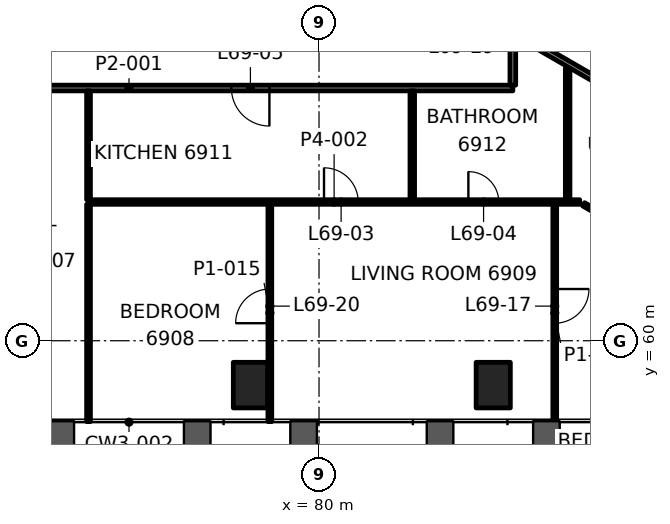
"""IFC4 building model, lengths in metres.
Left out: names, types, materials, properties, quantities, classifications, styles, units other than length and angle.
Written with IfcOpenShell. Run it as: python <this file> out.ifc"""

import sys

from ifc_helpers import new_model, si_unit, direction, frame, frame_2d, origin, origin_2d, place, context, subcontext, project, spatial, rectangle, hollow_rectangle, extrude, element, fill, save


model = new_model("IFC4")
c1 = context("Model", 3, precision=1e-05, world=origin(), true_north=direction((0.0, 1.0)))
c2 = subcontext(c1, "Body", "Model", "MODEL_VIEW")
j1 = project(units=[si_unit("LENGTHUNIT", "METRE"), si_unit("PLANEANGLEUNIT", "RADIAN")], contexts=[c1])
p1 = place(None, origin())
s1 = spatial("IfcSite", under=j1, at=p1, CompositionType="ELEMENT")
p2 = place(p1, origin())
s2 = spatial("IfcBuilding", under=s1, at=p2, CompositionType="ELEMENT")
p3 = place(p2, frame((0.0, 0.0, 288.1)))
s3 = spatial("IfcBuildingStorey", under=s2, at=p3, CompositionType="ELEMENT", Elevation=288.1)
for number, where, z_axis, x_axis in (
    (1, (78.195, 58.832, -0.0), (0.0, 0.0, 1.0), (1.0, 0.0, 0.0)),
    (2, (84.584, 58.832, -0.0), (0.0, 0.0, 1.0), (1.0, 0.0, 0.0)),
):
    element("IfcColumn", number, at=place(p3, frame(where, z_axis=z_axis, x_axis=x_axis)), inside=s3, PredefinedType="COLUMN", context=c2, shape_type="SweptSolid", body=[
        extrude(hollow_rectangle(XDim=0.9, YDim=1.2, WallThickness=0.06, at=origin_2d()), origin(), (0.0, 0.0, 1.0), 3.5),
    ])
p4 = place(p3, frame((73.935, 63.65, 0.0), z_axis=(0.0, 0.0, 1.0), x_axis=(1.0, 0.0, 0.0)))
e3 = element("IfcWall", 3, at=p4, inside=s3, PredefinedType="PARTITIONING", context=c2, shape_type="SweptSolid", body=[
    extrude(rectangle(XDim=12.924, YDim=0.12, at=frame_2d((6.462, 0.0))), origin(), (0.0, 0.0, 1.0), 2.7),
])
p5 = place(p4, frame((6.197, 0.0, 0.0)))
e4 = element("IfcOpeningElement", 4, at=p5, cuts=e3, PredefinedType="OPENING", context=c2, shape_type="SweptSolid", body=[
    extrude(rectangle(XDim=0.9, YDim=2.1, at=frame_2d((0.45, 1.05))), frame((0.0, 0.07, 0.0), z_axis=(0.0, -1.0, 0.0), x_axis=(1.0, 0.0, 0.0)), (0.0, 0.0, 1.0), 0.14),
])
p6 = place(p4, frame((9.995, 0.0, 0.0)))
e5 = element("IfcOpeningElement", 5, at=p6, cuts=e3, PredefinedType="OPENING", context=c2, shape_type="SweptSolid", body=[
    extrude(rectangle(XDim=0.8, YDim=2.1, at=frame_2d((0.4, 1.05))), frame((0.0, 0.07, 0.0), z_axis=(0.0, -1.0, 0.0), x_axis=(1.0, 0.0, 0.0)), (0.0, 0.0, 1.0), 0.14),
])
p7 = place(p3, frame((85.1, 66.65, 0.0), z_axis=(0.0, 0.0, 1.0), x_axis=(-1.0, 0.0, 0.0)))
e6 = element("IfcWall", 6, at=p7, inside=s3, PredefinedType="PARTITIONING", context=c2, shape_type="SweptSolid", body=[
    extrude(rectangle(XDim=20.2, YDim=0.15, at=frame_2d((10.1, 0.0))), origin(), (0.0, 0.0, 1.0), 2.7),
])
p8 = place(p7, frame((6.405, 0.0, 0.0)))
e7 = element("IfcOpeningElement", 7, at=p8, cuts=e6, PredefinedType="OPENING", context=c2, shape_type="SweptSolid", body=[
    extrude(rectangle(XDim=1.0, YDim=2.1, at=frame_2d((0.5, 1.05))), frame((0.0, 0.085, 0.0), z_axis=(0.0, -1.0, 0.0), x_axis=(1.0, 0.0, 0.0)), (0.0, 0.0, 1.0), 0.17),
])
p9 = place(p7, frame((12.845, 0.0, 0.0)))
e8 = element("IfcOpeningElement", 8, at=p9, cuts=e6, PredefinedType="OPENING", context=c2, shape_type="SweptSolid", body=[
    extrude(rectangle(XDim=0.9, YDim=2.1, at=frame_2d((0.45, 1.05))), frame((0.0, 0.085, 0.0), z_axis=(0.0, -1.0, 0.0), x_axis=(1.0, 0.0, 0.0)), (0.0, 0.0, 1.0), 0.17),
])
p10 = place(p3, frame((86.542, 63.71, 0.0), z_axis=(0.0, 0.0, 1.0), x_axis=(0.0, 1.0, 0.0)))
e9 = element("IfcWall", 9, at=p10, inside=s3, PredefinedType="PARTITIONING", context=c2, shape_type="SweptSolid", body=[
    extrude(rectangle(XDim=3.46, YDim=0.12, at=frame_2d((1.73, 0.0))), origin(), (0.0, 0.0, 1.0), 2.547),
])
p11 = place(p3, frame((86.203, 63.59, 0.0), z_axis=(0.0, 0.0, 1.0), x_axis=(0.0, -1.0, 0.0)))
e10 = element("IfcWall", 10, at=p11, inside=s3, PredefinedType="PARTITIONING", context=c2, shape_type="SweptSolid", body=[
    extrude(rectangle(XDim=5.718, YDim=0.1, at=frame_2d((2.859, 0.0))), origin(), (0.0, 0.0, 1.0), 2.7),
])
p12 = place(p11, frame((2.229, 0.0, 0.0)))
e11 = element("IfcOpeningElement", 11, at=p12, cuts=e10, PredefinedType="OPENING", context=c2, shape_type="SweptSolid", body=[
    extrude(rectangle(XDim=0.9, YDim=2.1, at=frame_2d((0.45, 1.05))), frame((0.0, 0.06, 0.0), z_axis=(0.0, -1.0, 0.0), x_axis=(1.0, 0.0, 0.0)), (0.0, 0.0, 1.0), 0.12),
])
p13 = place(p3, frame((85.1, 66.725, 0.0), z_axis=(0.0, 0.0, 1.0), x_axis=(0.0, 1.0, 0.0)))
e12 = element("IfcWall", 12, at=p13, inside=s3, PredefinedType="PARTITIONING", context=c2, shape_type="SweptSolid", body=[
    extrude(rectangle(XDim=1.268, YDim=0.15, at=frame_2d((0.634, 0.0))), origin(), (0.0, 0.0, 1.0), 2.547),
])
p14 = place(p3, frame((82.454, 63.71, 0.0), z_axis=(0.0, 0.0, 1.0), x_axis=(0.0, 1.0, 0.0)))
e13 = element("IfcWall", 13, at=p14, inside=s3, PredefinedType="PARTITIONING", context=c2, shape_type="SweptSolid", body=[
    extrude(rectangle(XDim=2.865, YDim=0.12, at=frame_2d((1.433, 0.0))), origin(), (0.0, 0.0, 1.0), 2.7),
])
p15 = place(p3, frame((78.706, 57.872, 0.0), z_axis=(0.0, 0.0, 1.0), x_axis=(0.0, 1.0, 0.0)))
e14 = element("IfcWall", 14, at=p15, inside=s3, PredefinedType="PARTITIONING", context=c2, shape_type="SweptSolid", body=[
    extrude(rectangle(XDim=5.718, YDim=0.1, at=frame_2d((2.859, 0.0))), origin(), (0.0, 0.0, 1.0), 2.688),
])
p16 = place(p15, frame((2.589, 0.0, 0.0)))
e15 = element("IfcOpeningElement", 15, at=p16, cuts=e14, PredefinedType="OPENING", context=c2, shape_type="SweptSolid", body=[
    extrude(rectangle(XDim=0.9, YDim=2.1, at=frame_2d((0.45, 1.05))), frame((0.0, 0.06, 0.0), z_axis=(0.0, -1.0, 0.0), x_axis=(1.0, 0.0, 0.0)), (0.0, 0.0, 1.0), 0.12),
])
p17 = place(p3, frame((73.935, 57.872, 0.0), z_axis=(0.0, 0.0, 1.0), x_axis=(0.0, 1.0, 0.0)))
e16 = element("IfcWall", 16, at=p17, inside=s3, PredefinedType="PARTITIONING", context=c2, shape_type="SweptSolid", body=[
    extrude(rectangle(XDim=5.718, YDim=0.1, at=frame_2d((2.859, 0.0))), origin(), (0.0, 0.0, 1.0), 2.688),
])
p18 = place(p3, frame((97.014, 63.329, 0.0), z_axis=(0.0, 0.0, 1.0), x_axis=(-0.866023045711, 0.500004084281, 0.0)))
e17 = element("IfcWall", 17, at=p18, inside=s3, PredefinedType="PARTITIONING", context=c2, shape_type="SweptSolid", body=[
    extrude(rectangle(XDim=13.757, YDim=0.15, at=frame_2d((6.879, 0.0))), origin(), (0.0, 0.0, 1.0), 2.7),
])
p19 = place(p18, frame((1.39, 0.0, 0.0)))
e18 = element("IfcOpeningElement", 18, at=p19, cuts=e17, PredefinedType="OPENING", context=c2, shape_type="SweptSolid", body=[
    extrude(rectangle(XDim=0.9, YDim=2.1, at=frame_2d((0.45, 1.05))), frame((0.0, 0.085, 0.0), z_axis=(0.0, -1.0, 0.0), x_axis=(1.0, 0.0, 0.0)), (0.0, 0.0, 1.0), 0.17),
])
p20 = place(p18, frame((4.821, 0.0, 0.0)))
e19 = element("IfcOpeningElement", 19, at=p20, cuts=e17, PredefinedType="OPENING", context=c2, shape_type="SweptSolid", body=[
    extrude(rectangle(XDim=1.0, YDim=2.1, at=frame_2d((0.5, 1.05))), frame((0.0, 0.085, 0.0), z_axis=(0.0, -1.0, 0.0), x_axis=(1.0, 0.0, 0.0)), (0.0, 0.0, 1.0), 0.17),
])
p21 = place(p18, frame((11.634, 0.0, 0.0)))
e20 = element("IfcOpeningElement", 20, at=p21, cuts=e17, PredefinedType="OPENING", context=c2, shape_type="SweptSolid", body=[
    extrude(rectangle(XDim=0.9, YDim=2.1, at=frame_2d((0.45, 1.05))), frame((0.0, 0.085, 0.0), z_axis=(0.0, -1.0, 0.0), x_axis=(1.0, 0.0, 0.0)), (0.0, 0.0, 1.0), 0.17),
])
p22 = place(p3, frame((96.114, 61.771, 0.0), z_axis=(0.0, 0.0, 1.0), x_axis=(-0.866021912989, 0.500006046186, 0.0)))
e21 = element("IfcWall", 21, at=p22, inside=s3, PredefinedType="PARTITIONING", context=c2, shape_type="SweptSolid", body=[
    extrude(rectangle(XDim=12.718, YDim=0.15, at=frame_2d((6.359, 0.0))), origin(), (0.0, 0.0, 1.0), 2.547),
])
p23 = place(p3, frame((86.963, 63.59, 0.0), z_axis=(0.0, 0.0, 1.0), x_axis=(0.866028993663, -0.499993782096, 0.0)))
e22 = element("IfcWall", 22, at=p23, inside=s3, PredefinedType="PARTITIONING", context=c2, shape_type="SweptSolid", body=[
    extrude(rectangle(XDim=4.543, YDim=0.1, at=frame_2d((2.272, 0.0))), origin(), (0.0, 0.0, 1.0), 2.7),
])
p24 = place(p23, frame((1.822, 0.0, 0.0)))
e23 = element("IfcOpeningElement", 23, at=p24, cuts=e22, PredefinedType="OPENING", context=c2, shape_type="SweptSolid", body=[
    extrude(rectangle(XDim=0.9, YDim=2.1, at=frame_2d((0.45, 1.05))), frame((0.0, 0.06, 0.0), z_axis=(0.0, -1.0, 0.0), x_axis=(1.0, 0.0, 0.0)), (0.0, 0.0, 1.0), 0.12),
])
p25 = place(p3, frame((73.935, 63.71, 0.0), z_axis=(0.0, 0.0, 1.0), x_axis=(0.0, 1.0, 0.0)))
e24 = element("IfcWall", 24, at=p25, inside=s3, PredefinedType="PARTITIONING", context=c2, shape_type="SweptSolid", body=[
    extrude(rectangle(XDim=2.865, YDim=0.1, at=frame_2d((1.433, 0.0))), origin(), (0.0, 0.0, 1.0), 2.7),
])
p26 = place(p5, origin())
e25 = element("IfcDoor", 25, at=p26, inside=s3, OperationType="SINGLE_SWING_RIGHT", PredefinedType="DOOR", context=c2, shape_type="SweptSolid", body=[
    extrude(rectangle(XDim=0.9, YDim=2.1, at=frame_2d((0.45, 1.05))), frame((0.0, 0.025, 0.0), z_axis=(0.0, -1.0, 0.0), x_axis=(1.0, 0.0, 0.0)), (0.0, 0.0, 1.0), 0.05),
])
fill(e4, e25)
p27 = place(p6, origin())
e26 = element("IfcDoor", 26, at=p27, inside=s3, OperationType="SINGLE_SWING_LEFT", PredefinedType="DOOR", context=c2, shape_type="SweptSolid", body=[
    extrude(rectangle(XDim=0.8, YDim=2.1, at=frame_2d((0.4, 1.05))), frame((0.0, 0.025, 0.0), z_axis=(0.0, -1.0, 0.0), x_axis=(1.0, 0.0, 0.0)), (0.0, 0.0, 1.0), 0.05),
])
fill(e5, e26)
p28 = place(p8, origin())
e27 = element("IfcDoor", 27, at=p28, inside=s3, OperationType="SINGLE_SWING_RIGHT", PredefinedType="DOOR", context=c2, shape_type="SweptSolid", body=[
    extrude(rectangle(XDim=1.0, YDim=2.1, at=frame_2d((0.5, 1.05))), frame((0.0, 0.025, 0.0), z_axis=(0.0, -1.0, 0.0), x_axis=(1.0, 0.0, 0.0)), (0.0, 0.0, 1.0), 0.05),
])
fill(e7, e27)
p29 = place(p12, origin())
e28 = element("IfcDoor", 28, at=p29, inside=s3, OperationType="SINGLE_SWING_LEFT", PredefinedType="DOOR", context=c2, shape_type="SweptSolid", body=[
    extrude(rectangle(XDim=0.9, YDim=2.1, at=frame_2d((0.45, 1.05))), frame((0.0, 0.025, 0.0), z_axis=(0.0, -1.0, 0.0), x_axis=(1.0, 0.0, 0.0)), (0.0, 0.0, 1.0), 0.05),
])
fill(e11, e28)
p30 = place(p16, origin())
e29 = element("IfcDoor", 29, at=p30, inside=s3, OperationType="SINGLE_SWING_LEFT", PredefinedType="DOOR", context=c2, shape_type="SweptSolid", body=[
    extrude(rectangle(XDim=0.9, YDim=2.1, at=frame_2d((0.45, 1.05))), frame((0.0, 0.025, 0.0), z_axis=(0.0, -1.0, 0.0), x_axis=(1.0, 0.0, 0.0)), (0.0, 0.0, 1.0), 0.05),
])
fill(e15, e29)
save(model, sys.argv[1])
